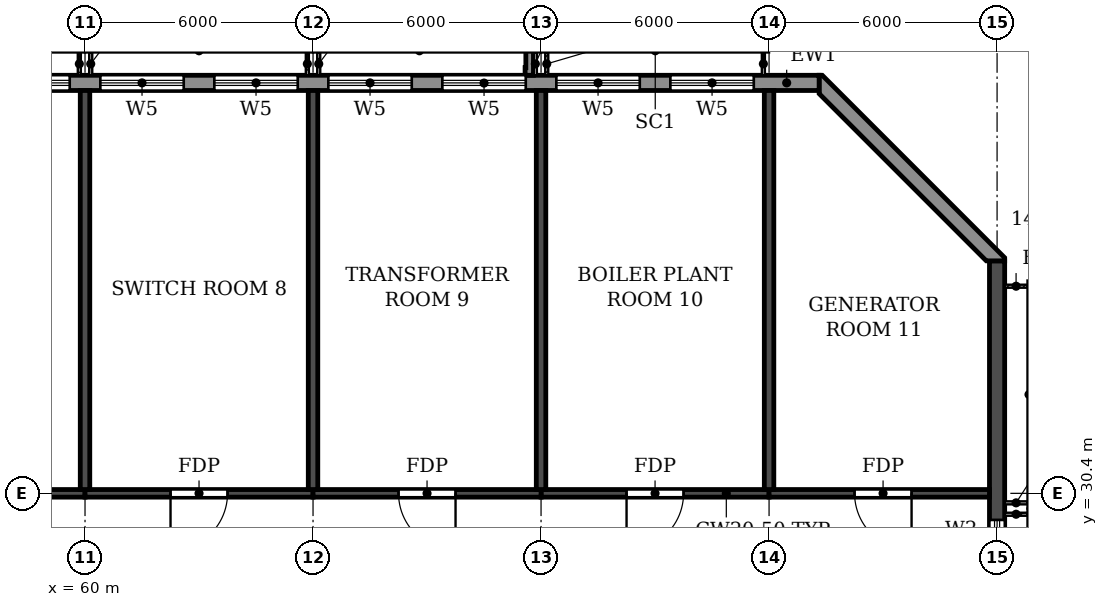
"""IFC4 building model, lengths in metres.
Left out: names, types, materials, properties, quantities, classifications, styles, units other than length and angle.
Written with IfcOpenShell. Run it as: python <this file> out.ifc"""

import sys

from ifc_helpers import new_model, si_unit, direction, frame, frame_2d, origin, place, context, subcontext, project, spatial, polyline, rectangle, outline, extrude, element, fill, save


model = new_model("IFC4")
c1 = context("Model", 3, precision=1e-05, world=origin(), true_north=direction((0.0, 1.0)))
c2 = subcontext(c1, "Body", "Model", "MODEL_VIEW")
j1 = project(units=[si_unit("LENGTHUNIT", "METRE"), si_unit("PLANEANGLEUNIT", "RADIAN")], contexts=[c1])
p1 = place(None, origin())
s1 = spatial("IfcSite", under=j1, at=p1, CompositionType="ELEMENT")
p2 = place(p1, origin())
s2 = spatial("IfcBuilding", under=s1, at=p2, CompositionType="ELEMENT")
p3 = place(p2, frame((0.0, 0.0, 267.0)))
s3 = spatial("IfcBuildingStorey", under=s2, at=p3, CompositionType="ELEMENT", Elevation=267.0)
for number, where, z_axis, x_axis in (
    (1, (60.0, 30.5, 0.0), (0.0, 0.0, 1.0), (0.0, 1.0, 0.0)),
    (2, (66.0, 30.5, 0.0), (0.0, 0.0, 1.0), (0.0, 1.0, 0.0)),
    (3, (72.0, 30.5, 0.0), (0.0, 0.0, 1.0), (0.0, 1.0, 0.0)),
    (4, (78.0, 30.5, 0.0), (0.0, 0.0, 1.0), (0.0, 1.0, 0.0)),
):
    element("IfcWall", number, at=place(p3, frame(where, z_axis=z_axis, x_axis=x_axis)), inside=s3, PredefinedType="SHEAR", context=c2, shape_type="SweptSolid", body=[
        extrude(rectangle(XDim=10.5, YDim=0.25, at=frame_2d((5.25, 0.0))), origin(), (0.0, 0.0, 1.0), 5.15),
    ])
p4 = place(p3, frame((84.0, 4.683, 0.0), z_axis=(0.0, 0.0, 1.0), x_axis=(0.0, 1.0, 0.0)))
e5 = element("IfcWall", 5, at=p4, inside=s3, PredefinedType="SHEAR", context=c2, shape_type="SweptSolid", body=[
    extrude(rectangle(XDim=31.834, YDim=0.4, at=frame_2d((15.917, 0.0))), origin(), (0.0, 0.0, 1.0), 5.15),
])
p5 = place(p4, frame((23.817, 0.0, 0.9)))
e6 = element("IfcOpeningElement", 6, at=p5, cuts=e5, PredefinedType="OPENING", context=c2, shape_type="SweptSolid", body=[
    extrude(rectangle(XDim=1.2, YDim=1.5, at=frame_2d((0.6, 0.75))), frame((0.0, 0.21, 0.0), z_axis=(0.0, -1.0, 0.0), x_axis=(1.0, 0.0, 0.0)), (0.0, 0.0, 1.0), 0.42),
])
p6 = place(p4, frame((8.017, 0.0, 0.9)))
e7 = element("IfcOpeningElement", 7, at=p6, cuts=e5, PredefinedType="OPENING", context=c2, shape_type="SweptSolid", body=[
    extrude(rectangle(XDim=1.2, YDim=1.5, at=frame_2d((0.6, 0.75))), frame((0.0, 0.21, 0.0), z_axis=(0.0, -1.0, 0.0), x_axis=(1.0, 0.0, 0.0)), (0.0, 0.0, 1.0), 0.42),
])
p7 = place(p4, frame((15.917, 0.0, 0.9)))
e8 = element("IfcOpeningElement", 8, at=p7, cuts=e5, PredefinedType="OPENING", context=c2, shape_type="SweptSolid", body=[
    extrude(rectangle(XDim=1.2, YDim=1.5, at=frame_2d((0.6, 0.75))), frame((0.0, 0.21, 0.0), z_axis=(0.0, -1.0, 0.0), x_axis=(1.0, 0.0, 0.0)), (0.0, 0.0, 1.0), 0.42),
])
p8 = place(p3, frame((54.0, 30.4, 0.0), z_axis=(0.0, 0.0, 1.0), x_axis=(1.0, 0.0, 0.0)))
e9 = element("IfcWall", 9, at=p8, inside=s3, PredefinedType="SHEAR", context=c2, shape_type="SweptSolid", body=[
    extrude(rectangle(XDim=6.0, YDim=0.2, at=frame_2d((3.0, 0.0))), origin(), (0.0, 0.0, 1.0), 4.55),
])
p9 = place(p8, frame((2.25, 0.0, 0.0)))
e10 = element("IfcOpeningElement", 10, at=p9, cuts=e9, PredefinedType="OPENING", context=c2, shape_type="SweptSolid", body=[
    extrude(rectangle(XDim=1.5, YDim=2.1, at=frame_2d((0.75, 1.05))), frame((0.0, 0.11, 0.0), z_axis=(0.0, -1.0, 0.0), x_axis=(1.0, 0.0, 0.0)), (0.0, 0.0, 1.0), 0.22),
])
p10 = place(p3, frame((60.0, 30.4, 0.0), z_axis=(0.0, 0.0, 1.0), x_axis=(1.0, 0.0, 0.0)))
e11 = element("IfcWall", 11, at=p10, inside=s3, PredefinedType="SHEAR", context=c2, shape_type="SweptSolid", body=[
    extrude(rectangle(XDim=6.0, YDim=0.2, at=frame_2d((3.0, 0.0))), origin(), (0.0, 0.0, 1.0), 4.55),
])
p11 = place(p10, frame((2.25, 0.0, 0.0)))
e12 = element("IfcOpeningElement", 12, at=p11, cuts=e11, PredefinedType="OPENING", context=c2, shape_type="SweptSolid", body=[
    extrude(rectangle(XDim=1.5, YDim=2.1, at=frame_2d((0.75, 1.05))), frame((0.0, 0.11, 0.0), z_axis=(0.0, -1.0, 0.0), x_axis=(1.0, 0.0, 0.0)), (0.0, 0.0, 1.0), 0.22),
])
p12 = place(p3, frame((66.0, 30.4, 0.0), z_axis=(0.0, 0.0, 1.0), x_axis=(1.0, 0.0, 0.0)))
e13 = element("IfcWall", 13, at=p12, inside=s3, PredefinedType="SHEAR", context=c2, shape_type="SweptSolid", body=[
    extrude(rectangle(XDim=6.0, YDim=0.2, at=frame_2d((3.0, 0.0))), origin(), (0.0, 0.0, 1.0), 4.55),
])
p13 = place(p12, frame((2.25, 0.0, 0.0)))
e14 = element("IfcOpeningElement", 14, at=p13, cuts=e13, PredefinedType="OPENING", context=c2, shape_type="SweptSolid", body=[
    extrude(rectangle(XDim=1.5, YDim=2.1, at=frame_2d((0.75, 1.05))), frame((0.0, 0.11, 0.0), z_axis=(0.0, -1.0, 0.0), x_axis=(1.0, 0.0, 0.0)), (0.0, 0.0, 1.0), 0.22),
])
p14 = place(p3, frame((72.0, 30.4, 0.0), z_axis=(0.0, 0.0, 1.0), x_axis=(1.0, 0.0, 0.0)))
e15 = element("IfcWall", 15, at=p14, inside=s3, PredefinedType="SHEAR", context=c2, shape_type="SweptSolid", body=[
    extrude(rectangle(XDim=6.0, YDim=0.2, at=frame_2d((3.0, 0.0))), origin(), (0.0, 0.0, 1.0), 4.55),
])
p15 = place(p14, frame((2.25, 0.0, 0.0)))
e16 = element("IfcOpeningElement", 16, at=p15, cuts=e15, PredefinedType="OPENING", context=c2, shape_type="SweptSolid", body=[
    extrude(rectangle(XDim=1.5, YDim=2.1, at=frame_2d((0.75, 1.05))), frame((0.0, 0.11, 0.0), z_axis=(0.0, -1.0, 0.0), x_axis=(1.0, 0.0, 0.0)), (0.0, 0.0, 1.0), 0.22),
])
p16 = place(p3, frame((78.0, 30.4, 0.0), z_axis=(0.0, 0.0, 1.0), x_axis=(1.0, 0.0, 0.0)))
e17 = element("IfcWall", 17, at=p16, inside=s3, PredefinedType="SHEAR", context=c2, shape_type="SweptSolid", body=[
    extrude(rectangle(XDim=5.8, YDim=0.2, at=frame_2d((2.9, 0.0))), origin(), (0.0, 0.0, 1.0), 4.55),
])
p17 = place(p16, frame((2.25, 0.0, 0.0)))
e18 = element("IfcOpeningElement", 18, at=p17, cuts=e17, PredefinedType="OPENING", context=c2, shape_type="SweptSolid", body=[
    extrude(rectangle(XDim=1.5, YDim=2.1, at=frame_2d((0.75, 1.05))), frame((0.0, 0.11, 0.0), z_axis=(0.0, -1.0, 0.0), x_axis=(1.0, 0.0, 0.0)), (0.0, 0.0, 1.0), 0.22),
])
p18 = place(p3, origin())
e19 = element("IfcWall", 19, at=p18, inside=s3, PredefinedType="STANDARD", context=c2, shape_type="SweptSolid", body=[
    extrude(outline(polyline([(84.2, 36.517), (84.2, 36.6), (79.4, 41.4), (79.317, 41.4), (79.317, 40.917), (83.717, 36.517), (84.2, 36.517)])), origin(), (0.0, 0.0, 1.0), 5.15),
])
p19 = place(p3, frame((79.317, 41.2, 0.0), z_axis=(0.0, 0.0, 1.0), x_axis=(-1.0, 0.0, 0.0)))
e20 = element("IfcWall", 20, at=p19, inside=s3, PredefinedType="STANDARD", context=c2, shape_type="SweptSolid", body=[
    extrude(rectangle(XDim=56.634, YDim=0.4, at=frame_2d((28.317, 0.0))), origin(), (0.0, 0.0, 1.0), 5.15),
])
p20 = place(p19, frame((52.717, 0.0, 0.6)))
e21 = element("IfcOpeningElement", 21, at=p20, cuts=e20, PredefinedType="OPENING", context=c2, shape_type="SweptSolid", body=[
    extrude(rectangle(XDim=2.2, YDim=2.4, at=frame_2d((1.1, 1.2))), frame((0.0, 0.21, 0.0), z_axis=(0.0, -1.0, 0.0), x_axis=(1.0, 0.0, 0.0)), (0.0, 0.0, 1.0), 0.42),
])
p21 = place(p19, frame((49.717, 0.0, 0.6)))
e22 = element("IfcOpeningElement", 22, at=p21, cuts=e20, PredefinedType="OPENING", context=c2, shape_type="SweptSolid", body=[
    extrude(rectangle(XDim=2.2, YDim=2.4, at=frame_2d((1.1, 1.2))), frame((0.0, 0.21, 0.0), z_axis=(0.0, -1.0, 0.0), x_axis=(1.0, 0.0, 0.0)), (0.0, 0.0, 1.0), 0.42),
])
p22 = place(p19, frame((46.717, 0.0, 0.6)))
e23 = element("IfcOpeningElement", 23, at=p22, cuts=e20, PredefinedType="OPENING", context=c2, shape_type="SweptSolid", body=[
    extrude(rectangle(XDim=2.2, YDim=2.4, at=frame_2d((1.1, 1.2))), frame((0.0, 0.21, 0.0), z_axis=(0.0, -1.0, 0.0), x_axis=(1.0, 0.0, 0.0)), (0.0, 0.0, 1.0), 0.42),
])
p23 = place(p19, frame((43.717, 0.0, 0.6)))
e24 = element("IfcOpeningElement", 24, at=p23, cuts=e20, PredefinedType="OPENING", context=c2, shape_type="SweptSolid", body=[
    extrude(rectangle(XDim=2.2, YDim=2.4, at=frame_2d((1.1, 1.2))), frame((0.0, 0.21, 0.0), z_axis=(0.0, -1.0, 0.0), x_axis=(1.0, 0.0, 0.0)), (0.0, 0.0, 1.0), 0.42),
])
p24 = place(p19, frame((40.717, 0.0, 0.6)))
e25 = element("IfcOpeningElement", 25, at=p24, cuts=e20, PredefinedType="OPENING", context=c2, shape_type="SweptSolid", body=[
    extrude(rectangle(XDim=2.2, YDim=2.4, at=frame_2d((1.1, 1.2))), frame((0.0, 0.21, 0.0), z_axis=(0.0, -1.0, 0.0), x_axis=(1.0, 0.0, 0.0)), (0.0, 0.0, 1.0), 0.42),
])
p25 = place(p19, frame((37.717, 0.0, 0.6)))
e26 = element("IfcOpeningElement", 26, at=p25, cuts=e20, PredefinedType="OPENING", context=c2, shape_type="SweptSolid", body=[
    extrude(rectangle(XDim=2.2, YDim=2.4, at=frame_2d((1.1, 1.2))), frame((0.0, 0.21, 0.0), z_axis=(0.0, -1.0, 0.0), x_axis=(1.0, 0.0, 0.0)), (0.0, 0.0, 1.0), 0.42),
])
p26 = place(p19, frame((34.717, 0.0, 0.6)))
e27 = element("IfcOpeningElement", 27, at=p26, cuts=e20, PredefinedType="OPENING", context=c2, shape_type="SweptSolid", body=[
    extrude(rectangle(XDim=2.2, YDim=2.4, at=frame_2d((1.1, 1.2))), frame((0.0, 0.21, 0.0), z_axis=(0.0, -1.0, 0.0), x_axis=(1.0, 0.0, 0.0)), (0.0, 0.0, 1.0), 0.42),
])
p27 = place(p19, frame((31.717, 0.0, 0.6)))
e28 = element("IfcOpeningElement", 28, at=p27, cuts=e20, PredefinedType="OPENING", context=c2, shape_type="SweptSolid", body=[
    extrude(rectangle(XDim=2.2, YDim=2.4, at=frame_2d((1.1, 1.2))), frame((0.0, 0.21, 0.0), z_axis=(0.0, -1.0, 0.0), x_axis=(1.0, 0.0, 0.0)), (0.0, 0.0, 1.0), 0.42),
])
p28 = place(p19, frame((28.717, 0.0, 0.6)))
e29 = element("IfcOpeningElement", 29, at=p28, cuts=e20, PredefinedType="OPENING", context=c2, shape_type="SweptSolid", body=[
    extrude(rectangle(XDim=2.2, YDim=2.4, at=frame_2d((1.1, 1.2))), frame((0.0, 0.21, 0.0), z_axis=(0.0, -1.0, 0.0), x_axis=(1.0, 0.0, 0.0)), (0.0, 0.0, 1.0), 0.42),
])
p29 = place(p19, frame((25.717, 0.0, 0.6)))
e30 = element("IfcOpeningElement", 30, at=p29, cuts=e20, PredefinedType="OPENING", context=c2, shape_type="SweptSolid", body=[
    extrude(rectangle(XDim=2.2, YDim=2.4, at=frame_2d((1.1, 1.2))), frame((0.0, 0.21, 0.0), z_axis=(0.0, -1.0, 0.0), x_axis=(1.0, 0.0, 0.0)), (0.0, 0.0, 1.0), 0.42),
])
p30 = place(p19, frame((22.717, 0.0, 0.6)))
e31 = element("IfcOpeningElement", 31, at=p30, cuts=e20, PredefinedType="OPENING", context=c2, shape_type="SweptSolid", body=[
    extrude(rectangle(XDim=2.2, YDim=2.4, at=frame_2d((1.1, 1.2))), frame((0.0, 0.21, 0.0), z_axis=(0.0, -1.0, 0.0), x_axis=(1.0, 0.0, 0.0)), (0.0, 0.0, 1.0), 0.42),
])
p31 = place(p19, frame((19.717, 0.0, 0.6)))
e32 = element("IfcOpeningElement", 32, at=p31, cuts=e20, PredefinedType="OPENING", context=c2, shape_type="SweptSolid", body=[
    extrude(rectangle(XDim=2.2, YDim=2.4, at=frame_2d((1.1, 1.2))), frame((0.0, 0.21, 0.0), z_axis=(0.0, -1.0, 0.0), x_axis=(1.0, 0.0, 0.0)), (0.0, 0.0, 1.0), 0.42),
])
p32 = place(p19, frame((16.717, 0.0, 0.6)))
e33 = element("IfcOpeningElement", 33, at=p32, cuts=e20, PredefinedType="OPENING", context=c2, shape_type="SweptSolid", body=[
    extrude(rectangle(XDim=2.2, YDim=2.4, at=frame_2d((1.1, 1.2))), frame((0.0, 0.21, 0.0), z_axis=(0.0, -1.0, 0.0), x_axis=(1.0, 0.0, 0.0)), (0.0, 0.0, 1.0), 0.42),
])
p33 = place(p19, frame((13.717, 0.0, 0.6)))
e34 = element("IfcOpeningElement", 34, at=p33, cuts=e20, PredefinedType="OPENING", context=c2, shape_type="SweptSolid", body=[
    extrude(rectangle(XDim=2.2, YDim=2.4, at=frame_2d((1.1, 1.2))), frame((0.0, 0.21, 0.0), z_axis=(0.0, -1.0, 0.0), x_axis=(1.0, 0.0, 0.0)), (0.0, 0.0, 1.0), 0.42),
])
p34 = place(p19, frame((10.717, 0.0, 0.6)))
e35 = element("IfcOpeningElement", 35, at=p34, cuts=e20, PredefinedType="OPENING", context=c2, shape_type="SweptSolid", body=[
    extrude(rectangle(XDim=2.2, YDim=2.4, at=frame_2d((1.1, 1.2))), frame((0.0, 0.21, 0.0), z_axis=(0.0, -1.0, 0.0), x_axis=(1.0, 0.0, 0.0)), (0.0, 0.0, 1.0), 0.42),
])
p35 = place(p19, frame((7.717, 0.0, 0.6)))
e36 = element("IfcOpeningElement", 36, at=p35, cuts=e20, PredefinedType="OPENING", context=c2, shape_type="SweptSolid", body=[
    extrude(rectangle(XDim=2.2, YDim=2.4, at=frame_2d((1.1, 1.2))), frame((0.0, 0.21, 0.0), z_axis=(0.0, -1.0, 0.0), x_axis=(1.0, 0.0, 0.0)), (0.0, 0.0, 1.0), 0.42),
])
p36 = place(p19, frame((4.717, 0.0, 0.6)))
e37 = element("IfcOpeningElement", 37, at=p36, cuts=e20, PredefinedType="OPENING", context=c2, shape_type="SweptSolid", body=[
    extrude(rectangle(XDim=2.2, YDim=2.4, at=frame_2d((1.1, 1.2))), frame((0.0, 0.21, 0.0), z_axis=(0.0, -1.0, 0.0), x_axis=(1.0, 0.0, 0.0)), (0.0, 0.0, 1.0), 0.42),
])
p37 = place(p19, frame((1.717, 0.0, 0.6)))
e38 = element("IfcOpeningElement", 38, at=p37, cuts=e20, PredefinedType="OPENING", context=c2, shape_type="SweptSolid", body=[
    extrude(rectangle(XDim=2.2, YDim=2.4, at=frame_2d((1.1, 1.2))), frame((0.0, 0.21, 0.0), z_axis=(0.0, -1.0, 0.0), x_axis=(1.0, 0.0, 0.0)), (0.0, 0.0, 1.0), 0.42),
])
p38 = place(p3, origin())
e39 = element("IfcWall", 39, at=p38, inside=s3, PredefinedType="PARAPET", context=c2, shape_type="SweptSolid", body=[
    extrude(outline(polyline([(30.22, 41.4), (30.42, 41.4), (30.42, 41.6), (30.4, 41.6), (30.4, 51.4), (71.6, 51.4), (71.6, 41.6), (71.58, 41.6), (71.58, 41.4), (71.68, 41.4), (71.78, 41.4), (71.8, 41.4), (71.8, 51.6), (30.2, 51.6), (30.2, 41.4), (30.22, 41.4), (30.22, 41.4)])), origin(), (0.0, 0.0, 1.0), 1.1),
])
p39 = place(p5, origin())
e40 = element("IfcWindow", 40, at=p39, inside=s3, PartitioningType="SINGLE_PANEL", PredefinedType="WINDOW", context=c2, shape_type="SweptSolid", body=[
    extrude(rectangle(XDim=1.2, YDim=1.5, at=frame_2d((0.6, 0.75))), frame((0.0, 0.03, 0.0), z_axis=(0.0, -1.0, 0.0), x_axis=(1.0, 0.0, 0.0)), (0.0, 0.0, 1.0), 0.06),
])
fill(e6, e40)
p40 = place(p31, origin())
e41 = element("IfcWindow", 41, at=p40, inside=s3, PartitioningType="TRIPLE_PANEL_HORIZONTAL", PredefinedType="WINDOW", context=c2, shape_type="SweptSolid", body=[
    extrude(rectangle(XDim=2.2, YDim=2.4, at=frame_2d((1.1, 1.2))), frame((0.0, 0.03, 0.0), z_axis=(0.0, -1.0, 0.0), x_axis=(1.0, 0.0, 0.0)), (0.0, 0.0, 1.0), 0.06),
])
fill(e32, e41)
p41 = place(p32, origin())
e42 = element("IfcWindow", 42, at=p41, inside=s3, PartitioningType="TRIPLE_PANEL_HORIZONTAL", PredefinedType="WINDOW", context=c2, shape_type="SweptSolid", body=[
    extrude(rectangle(XDim=2.2, YDim=2.4, at=frame_2d((1.1, 1.2))), frame((0.0, 0.03, 0.0), z_axis=(0.0, -1.0, 0.0), x_axis=(1.0, 0.0, 0.0)), (0.0, 0.0, 1.0), 0.06),
])
fill(e33, e42)
p42 = place(p33, origin())
e43 = element("IfcWindow", 43, at=p42, inside=s3, PartitioningType="TRIPLE_PANEL_HORIZONTAL", PredefinedType="WINDOW", context=c2, shape_type="SweptSolid", body=[
    extrude(rectangle(XDim=2.2, YDim=2.4, at=frame_2d((1.1, 1.2))), frame((0.0, 0.03, 0.0), z_axis=(0.0, -1.0, 0.0), x_axis=(1.0, 0.0, 0.0)), (0.0, 0.0, 1.0), 0.06),
])
fill(e34, e43)
p43 = place(p34, origin())
e44 = element("IfcWindow", 44, at=p43, inside=s3, PartitioningType="TRIPLE_PANEL_HORIZONTAL", PredefinedType="WINDOW", context=c2, shape_type="SweptSolid", body=[
    extrude(rectangle(XDim=2.2, YDim=2.4, at=frame_2d((1.1, 1.2))), frame((0.0, 0.03, 0.0), z_axis=(0.0, -1.0, 0.0), x_axis=(1.0, 0.0, 0.0)), (0.0, 0.0, 1.0), 0.06),
])
fill(e35, e44)
p44 = place(p35, origin())
e45 = element("IfcWindow", 45, at=p44, inside=s3, PartitioningType="TRIPLE_PANEL_HORIZONTAL", PredefinedType="WINDOW", context=c2, shape_type="SweptSolid", body=[
    extrude(rectangle(XDim=2.2, YDim=2.4, at=frame_2d((1.1, 1.2))), frame((0.0, 0.03, 0.0), z_axis=(0.0, -1.0, 0.0), x_axis=(1.0, 0.0, 0.0)), (0.0, 0.0, 1.0), 0.06),
])
fill(e36, e45)
p45 = place(p36, origin())
e46 = element("IfcWindow", 46, at=p45, inside=s3, PartitioningType="TRIPLE_PANEL_HORIZONTAL", PredefinedType="WINDOW", context=c2, shape_type="SweptSolid", body=[
    extrude(rectangle(XDim=2.2, YDim=2.4, at=frame_2d((1.1, 1.2))), frame((0.0, 0.03, 0.0), z_axis=(0.0, -1.0, 0.0), x_axis=(1.0, 0.0, 0.0)), (0.0, 0.0, 1.0), 0.06),
])
fill(e37, e46)
p46 = place(p37, origin())
e47 = element("IfcWindow", 47, at=p46, inside=s3, PartitioningType="TRIPLE_PANEL_HORIZONTAL", PredefinedType="WINDOW", context=c2, shape_type="SweptSolid", body=[
    extrude(rectangle(XDim=2.2, YDim=2.4, at=frame_2d((1.1, 1.2))), frame((0.0, 0.03, 0.0), z_axis=(0.0, -1.0, 0.0), x_axis=(1.0, 0.0, 0.0)), (0.0, 0.0, 1.0), 0.06),
])
fill(e38, e47)
p47 = place(p11, frame((1.5, 0.0, 0.0), z_axis=(0.0, 0.0, 1.0), x_axis=(-1.0, 0.0, 0.0)))
e48 = element("IfcDoor", 48, at=p47, inside=s3, OperationType="DOUBLE_DOOR_SINGLE_SWING", PredefinedType="DOOR", context=c2, shape_type="SweptSolid", body=[
    extrude(rectangle(XDim=1.5, YDim=2.1, at=frame_2d((0.75, 1.05))), frame((0.0, 0.025, 0.0), z_axis=(0.0, -1.0, 0.0), x_axis=(1.0, 0.0, 0.0)), (0.0, 0.0, 1.0), 0.05),
])
fill(e12, e48)
p48 = place(p13, frame((1.5, 0.0, 0.0), z_axis=(0.0, 0.0, 1.0), x_axis=(-1.0, 0.0, 0.0)))
e49 = element("IfcDoor", 49, at=p48, inside=s3, OperationType="DOUBLE_DOOR_SINGLE_SWING", PredefinedType="DOOR", context=c2, shape_type="SweptSolid", body=[
    extrude(rectangle(XDim=1.5, YDim=2.1, at=frame_2d((0.75, 1.05))), frame((0.0, 0.025, 0.0), z_axis=(0.0, -1.0, 0.0), x_axis=(1.0, 0.0, 0.0)), (0.0, 0.0, 1.0), 0.05),
])
fill(e14, e49)
p49 = place(p15, frame((1.5, 0.0, 0.0), z_axis=(0.0, 0.0, 1.0), x_axis=(-1.0, 0.0, 0.0)))
e50 = element("IfcDoor", 50, at=p49, inside=s3, OperationType="DOUBLE_DOOR_SINGLE_SWING", PredefinedType="DOOR", context=c2, shape_type="SweptSolid", body=[
    extrude(rectangle(XDim=1.5, YDim=2.1, at=frame_2d((0.75, 1.05))), frame((0.0, 0.025, 0.0), z_axis=(0.0, -1.0, 0.0), x_axis=(1.0, 0.0, 0.0)), (0.0, 0.0, 1.0), 0.05),
])
fill(e16, e50)
p50 = place(p17, frame((1.5, 0.0, 0.0), z_axis=(0.0, 0.0, 1.0), x_axis=(-1.0, 0.0, 0.0)))
e51 = element("IfcDoor", 51, at=p50, inside=s3, OperationType="DOUBLE_DOOR_SINGLE_SWING", PredefinedType="DOOR", context=c2, shape_type="SweptSolid", body=[
    extrude(rectangle(XDim=1.5, YDim=2.1, at=frame_2d((0.75, 1.05))), frame((0.0, 0.025, 0.0), z_axis=(0.0, -1.0, 0.0), x_axis=(1.0, 0.0, 0.0)), (0.0, 0.0, 1.0), 0.05),
])
fill(e18, e51)
save(model, sys.argv[1])
